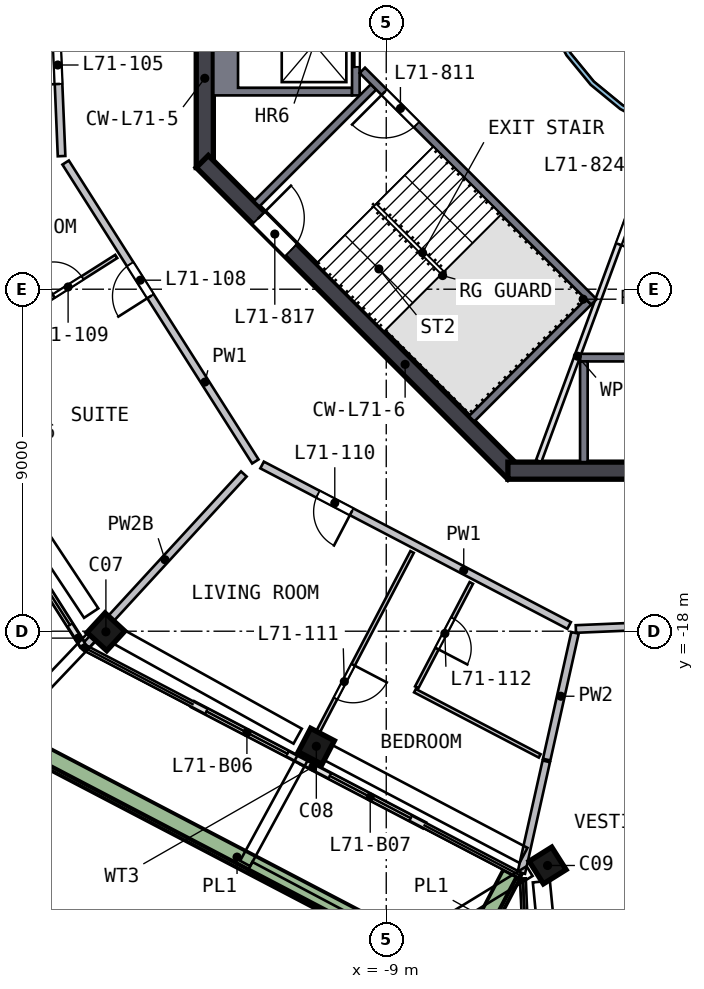
"""IFC4 building model, lengths in metres.
Left out: names, types, materials, properties, quantities, classifications, styles, units other than length and angle.
Written with IfcOpenShell. Run it as: python <this file> out.ifc"""

import sys

from ifc_helpers import new_model, si_unit, direction, frame, frame_2d, origin, origin_2d, place, context, subcontext, project, spatial, polyline, rectangle, outline, extrude, element, fill, save


model = new_model("IFC4")
c1 = context("Model", 3, precision=1e-05, world=origin(), true_north=direction((0.0, 1.0)))
c2 = subcontext(c1, "Body", "Model", "MODEL_VIEW")
j1 = project(units=[si_unit("LENGTHUNIT", "METRE"), si_unit("PLANEANGLEUNIT", "RADIAN")], contexts=[c1])
p1 = place(None, origin())
s1 = spatial("IfcSite", under=j1, at=p1, CompositionType="ELEMENT")
p2 = place(p1, origin())
s2 = spatial("IfcBuilding", under=s1, at=p2, CompositionType="ELEMENT")
p3 = place(p2, frame((0.0, 0.0, 288.0)))
s3 = spatial("IfcBuildingStorey", under=s2, at=p3, CompositionType="ELEMENT", Elevation=288.0)
p4 = place(p3, frame((-16.481, -17.923, 0.0), z_axis=(0.085902454, -0.077616288, 0.993275632), x_axis=(-0.731317306, 0.672140187, 0.115769454)))
e1 = element("IfcColumn", 1, at=p4, inside=s3, PredefinedType="COLUMN", context=c2, shape_type="SweptSolid", body=[
    extrude(rectangle(XDim=0.7, YDim=0.7, at=origin_2d()), origin(), (0.0, 0.0, 1.0), 3.211),
])
p5 = place(p3, frame((-10.961, -20.966, 0.0), z_axis=(0.100155575, -0.051332584, 0.993646731), x_axis=(0.880391875, -0.460700416, -0.112540095)))
e2 = element("IfcColumn", 2, at=p5, inside=s3, PredefinedType="COLUMN", context=c2, shape_type="SweptSolid", body=[
    extrude(rectangle(XDim=0.7, YDim=0.7, at=origin_2d()), origin(), (0.0, 0.0, 1.0), 3.21),
])
p6 = place(p3, frame((-4.894, -24.138, 0.0), z_axis=(0.114924367, -0.022346405, 0.993122867), x_axis=(-0.527951696, 0.845486805, 0.080119094)))
e3 = element("IfcColumn", 3, at=p6, inside=s3, PredefinedType="COLUMN", context=c2, shape_type="SweptSolid", body=[
    extrude(rectangle(XDim=0.7, YDim=0.7, at=origin_2d()), origin(), (0.0, 0.0, 1.0), 3.212),
])
p7 = place(p3, frame((-13.775, 5.799, 0.0), z_axis=(0.0, 0.0, 1.0), x_axis=(0.0, -1.0, 0.0)))
e4 = element("IfcWall", 4, at=p7, inside=s3, PredefinedType="SHEAR", context=c2, shape_type="SweptSolid", body=[
    extrude(rectangle(XDim=11.598, YDim=0.45, at=frame_2d((5.799, 0.0))), origin(), (0.0, 0.0, 1.0), 3.5),
])
p8 = place(p7, frame((4.899, 0.0, 0.0)))
e5 = element("IfcOpeningElement", 5, at=p8, cuts=e4, PredefinedType="OPENING", context=c2, shape_type="SweptSolid", body=[
    extrude(rectangle(XDim=1.8, YDim=2.1, at=frame_2d((0.9, 1.05))), frame((0.0, 0.235, 0.0), z_axis=(0.0, -1.0, 0.0), x_axis=(1.0, 0.0, 0.0)), (0.0, 0.0, 1.0), 0.47),
])
p9 = place(p3, frame((-13.841, -5.64, 0.0), z_axis=(0.0, 0.0, 1.0), x_axis=(0.707106781, -0.707106781, 0.0)))
e6 = element("IfcWall", 6, at=p9, inside=s3, PredefinedType="SHEAR", context=c2, shape_type="SweptSolid", body=[
    extrude(rectangle(XDim=11.598, YDim=0.45, at=frame_2d((5.799, 0.0))), origin(), (0.0, 0.0, 1.0), 3.5),
])
p10 = place(p9, frame((2.099, 0.0, 0.0)))
e7 = element("IfcOpeningElement", 7, at=p10, cuts=e6, PredefinedType="OPENING", context=c2, shape_type="SweptSolid", body=[
    extrude(rectangle(XDim=1.2, YDim=2.1, at=frame_2d((0.6, 1.05))), frame((0.0, 0.235, 0.0), z_axis=(0.0, -1.0, 0.0), x_axis=(1.0, 0.0, 0.0)), (0.0, 0.0, 1.0), 0.47),
])
p11 = place(p3, frame((-5.799, -13.775, 0.0), z_axis=(0.0, 0.0, 1.0), x_axis=(1.0, 0.0, 0.0)))
e8 = element("IfcWall", 8, at=p11, inside=s3, PredefinedType="SHEAR", context=c2, shape_type="SweptSolid", body=[
    extrude(rectangle(XDim=11.598, YDim=0.45, at=frame_2d((5.799, 0.0))), origin(), (0.0, 0.0, 1.0), 3.5),
])
p12 = place(p3, frame((-18.826, -15.468, 0.0), z_axis=(0.0, 0.0, 1.0), x_axis=(0.53583323, -0.844323842, 0.0)))
e9 = element("IfcWall", 9, at=p12, inside=s3, PredefinedType="SOLIDWALL", context=c2, shape_type="SweptSolid", body=[
    extrude(rectangle(XDim=3.427, YDim=0.15, at=frame_2d((1.713, 0.0))), origin(), (0.0, 0.0, 1.0), 2.525),
])
p13 = place(p12, frame((0.4, 0.0, 0.0)))
e10 = element("IfcOpeningElement", 10, at=p13, cuts=e9, PredefinedType="OPENING", context=c2, shape_type="SweptSolid", body=[
    extrude(rectangle(XDim=2.4, YDim=2.4, at=frame_2d((1.2, 1.2))), frame((0.0, 0.085, 0.0), z_axis=(0.0, -1.0, 0.0), x_axis=(1.0, 0.0, 0.0)), (0.0, 0.0, 1.0), 0.17),
])
p14 = place(p3, frame((-14.084, -19.926, 0.0), z_axis=(0.0, 0.0, 1.0), x_axis=(0.886182685, -0.463336001, 0.0)))
e11 = element("IfcWall", 11, at=p14, inside=s3, PredefinedType="SOLIDWALL", context=c2, shape_type="SweptSolid", body=[
    extrude(rectangle(XDim=3.25, YDim=0.15, at=frame_2d((1.625, 0.0))), origin(), (0.0, 0.0, 1.0), 2.525),
])
p15 = place(p14, frame((0.4, 0.0, 0.0)))
e12 = element("IfcOpeningElement", 12, at=p15, cuts=e11, PredefinedType="OPENING", context=c2, shape_type="SweptSolid", body=[
    extrude(rectangle(XDim=2.4, YDim=2.4, at=frame_2d((1.2, 1.2))), frame((0.0, 0.085, 0.0), z_axis=(0.0, -1.0, 0.0), x_axis=(1.0, 0.0, 0.0)), (0.0, 0.0, 1.0), 0.17),
])
p16 = place(p3, frame((-11.204, -21.431, 0.0), z_axis=(0.0, 0.0, 1.0), x_axis=(0.886209674, -0.463284377, 0.0)))
e13 = element("IfcWall", 13, at=p16, inside=s3, PredefinedType="SOLIDWALL", context=c2, shape_type="SweptSolid", body=[
    extrude(rectangle(XDim=3.611, YDim=0.15, at=frame_2d((1.806, 0.0))), origin(), (0.0, 0.0, 1.0), 2.525),
])
p17 = place(p16, frame((0.811, 0.0, 0.0)))
e14 = element("IfcOpeningElement", 14, at=p17, cuts=e13, PredefinedType="OPENING", context=c2, shape_type="SweptSolid", body=[
    extrude(rectangle(XDim=2.4, YDim=2.4, at=frame_2d((1.2, 1.2))), frame((0.0, 0.085, 0.0), z_axis=(0.0, -1.0, 0.0), x_axis=(1.0, 0.0, 0.0)), (0.0, 0.0, 1.0), 0.17),
])
p18 = place(p3, frame((-19.007, -20.766, 0.0), z_axis=(0.0, 0.0, 1.0), x_axis=(0.886208346, -0.463286917, 0.0)))
e15 = element("IfcWall", 15, at=p18, inside=s3, PredefinedType="SOLIDWALL", context=c2, shape_type="SweptSolid", body=[
    extrude(rectangle(XDim=13.723, YDim=0.5, at=frame_2d((6.862, 0.0))), origin(), (0.0, 0.0, 1.0), 0.7),
])
p19 = place(p3, frame((-6.951, -26.786, 0.0), z_axis=(0.0, 0.0, 1.0), x_axis=(0.463313949, 0.886194214, 0.0)))
e16 = element("IfcWall", 16, at=p19, inside=s3, PredefinedType="SOLIDWALL", context=c2, shape_type="SweptSolid", body=[
    extrude(rectangle(XDim=2.699, YDim=0.5, at=frame_2d((1.35, 0.0))), origin(), (0.0, 0.0, 1.0), 0.7),
])
p20 = place(p3, origin())
e17 = element("IfcWall", 17, at=p20, inside=s3, PredefinedType="SOLIDWALL", context=c2, shape_type="SweptSolid", body=[
    extrude(outline(polyline([(-13.55, -3.9), (-13.55, -1.2), (-9.9, -1.2), (-9.9, -1.4), (-12.9, -1.4), (-12.9, -3.7), (-9.9, -3.7), (-9.9, -3.9), (-13.55, -3.9)])), origin(), (0.0, 0.0, 1.0), 3.19),
])
p21 = place(p3, frame((-9.8, -1.2, 0.0), z_axis=(0.0, 0.0, 1.0), x_axis=(0.0, -1.0, 0.0)))
e18 = element("IfcWall", 18, at=p21, inside=s3, PredefinedType="SOLIDWALL", context=c2, shape_type="SweptSolid", body=[
    extrude(rectangle(XDim=2.7, YDim=0.2, at=frame_2d((1.35, 0.0))), origin(), (0.0, 0.0, 1.0), 3.19),
])
p22 = place(p21, frame((0.75, 0.0, 0.0)))
e19 = element("IfcOpeningElement", 19, at=p22, cuts=e18, PredefinedType="OPENING", context=c2, shape_type="SweptSolid", body=[
    extrude(rectangle(XDim=1.2, YDim=2.1, at=frame_2d((0.6, 1.05))), frame((0.0, 0.11, 0.0), z_axis=(0.0, -1.0, 0.0), x_axis=(1.0, 0.0, 0.0)), (0.0, 0.0, 1.0), 0.22),
])
p23 = place(p3, frame((-3.9, -10.8, 0.0), z_axis=(0.0, 0.0, 1.0), x_axis=(1.0, 0.0, 0.0)))
e20 = element("IfcWall", 20, at=p23, inside=s3, PredefinedType="SOLIDWALL", context=c2, shape_type="SweptSolid", body=[
    extrude(rectangle(XDim=7.8, YDim=0.2, at=frame_2d((3.9, 0.0))), origin(), (0.0, 0.0, 1.0), 3.19),
])
p24 = place(p23, frame((3.45, 0.0, 0.0)))
e21 = element("IfcOpeningElement", 21, at=p24, cuts=e20, PredefinedType="OPENING", context=c2, shape_type="SweptSolid", body=[
    extrude(rectangle(XDim=0.9, YDim=2.1, at=frame_2d((0.45, 1.05))), frame((0.0, 0.11, 0.0), z_axis=(0.0, -1.0, 0.0), x_axis=(1.0, 0.0, 0.0)), (0.0, 0.0, 1.0), 0.22),
])
p25 = place(p3, frame((-3.8, -10.9, 0.0), z_axis=(0.0, 0.0, 1.0), x_axis=(0.0, -1.0, 0.0)))
e22 = element("IfcWall", 22, at=p25, inside=s3, PredefinedType="SOLIDWALL", context=c2, shape_type="SweptSolid", body=[
    extrude(rectangle(XDim=2.65, YDim=0.2, at=frame_2d((1.325, 0.0))), origin(), (0.0, 0.0, 1.0), 3.19),
])
p26 = place(p3, frame((-3.535, -9.334, 0.0), z_axis=(0.0, 0.0, 1.0), x_axis=(-0.707120946, 0.707092617, 0.0)))
e23 = element("IfcWall", 23, at=p26, inside=s3, PredefinedType="SOLIDWALL", context=c2, shape_type="SweptSolid", body=[
    extrude(rectangle(XDim=8.618, YDim=0.2, at=frame_2d((4.309, 0.0))), origin(), (0.0, 0.0, 1.0), 3.19),
])
p27 = place(p26, frame((6.6, 0.0, 0.0)))
e24 = element("IfcOpeningElement", 24, at=p27, cuts=e23, PredefinedType="OPENING", context=c2, shape_type="SweptSolid", body=[
    extrude(rectangle(XDim=1.2, YDim=2.1, at=frame_2d((0.6, 1.05))), frame((0.0, 0.11, 0.0), z_axis=(0.0, -1.0, 0.0), x_axis=(1.0, 0.0, 0.0)), (0.0, 0.0, 1.0), 0.22),
])
for number, where, z_axis, x_axis in (
    (25, (-9.334, -3.677, 0.0), (0.0, 0.0, 1.0), (-0.707, -0.707, 0.0)),
    (26, (-3.677, -9.334, 0.0), (0.0, 0.0, 1.0), (-0.707, -0.707, 0.0)),
):
    element("IfcWall", number, at=place(p3, frame(where, z_axis=z_axis, x_axis=x_axis)), inside=s3, PredefinedType="SOLIDWALL", context=c2, shape_type="SweptSolid", body=[
        extrude(rectangle(XDim=4.35, YDim=0.2, at=frame_2d((2.175, 0.0))), origin(), (0.0, 0.0, 1.0), 3.19),
    ])
p28 = place(p3, frame((-1.776, -4.813, 0.0), z_axis=(0.0, 0.0, 1.0), x_axis=(-0.346114844, -0.938192152, 0.0)))
e27 = element("IfcWall", 27, at=p28, inside=s3, PredefinedType="PARTITIONING", context=c2, shape_type="SweptSolid", body=[
    extrude(rectangle(XDim=9.283, YDim=0.15, at=frame_2d((4.641, 0.0))), origin(), (0.0, 0.0, 1.0), 3.19),
])
p29 = place(p28, frame((1.4, 0.0, 0.0)))
e28 = element("IfcOpeningElement", 28, at=p29, cuts=e27, PredefinedType="OPENING", context=c2, shape_type="SweptSolid", body=[
    extrude(rectangle(XDim=1.8, YDim=2.1, at=frame_2d((0.9, 1.05))), frame((0.0, 0.085, 0.0), z_axis=(0.0, -1.0, 0.0), x_axis=(1.0, 0.0, 0.0)), (0.0, 0.0, 1.0), 0.17),
])
p30 = place(p3, origin())
e29 = element("IfcWall", 29, at=p30, inside=s3, PredefinedType="SOLIDWALL", context=c2, shape_type="SweptSolid", body=[
    extrude(outline(polyline([(5.021, -0.999), (4.73, -1.959), (4.257, -2.844), (3.62, -3.62), (2.844, -4.257), (1.959, -4.73), (0.999, -5.021), (0.0, -5.12), (-0.999, -5.021), (-1.959, -4.73), (-2.844, -4.257), (-3.62, -3.62), (-4.257, -2.844), (-4.73, -1.959), (-5.021, -0.999), (-5.12, 0.0), (-5.021, 0.999), (-4.73, 1.959), (-4.257, 2.844), (-3.62, 3.62), (-2.844, 4.257), (-1.959, 4.73), (-0.999, 5.021), (0.0, 5.12), (0.999, 5.021), (1.959, 4.73), (2.844, 4.257), (3.62, 3.62), (4.257, 2.844), (4.73, 1.959), (5.021, 0.999), (5.12, 0.0), (5.021, -0.999)]), holes=[polyline([(4.904, 0.976), (4.619, 1.913), (4.157, 2.778), (3.535, 3.535), (2.778, 4.157), (1.913, 4.619), (0.976, 4.904), (0.0, 5.0), (-0.976, 4.904), (-1.913, 4.619), (-2.778, 4.157), (-3.535, 3.535), (-4.157, 2.778), (-4.619, 1.913), (-4.904, 0.976), (-5.0, 0.0), (-4.904, -0.976), (-4.619, -1.913), (-4.157, -2.778), (-3.535, -3.535), (-2.778, -4.157), (-1.913, -4.619), (-0.976, -4.904), (0.0, -5.0), (0.976, -4.904), (1.913, -4.619), (2.778, -4.157), (3.535, -3.535), (4.157, -2.778), (4.619, -1.913), (4.904, -0.976), (5.0, 0.0), (4.904, 0.976)])]), origin(), (0.0, 0.0, 1.0), 3.19),
])
p31 = place(p3, frame((-17.543, -5.498, 0.0), z_axis=(0.0, 0.0, 1.0), x_axis=(-0.041874694, 0.99912287, 0.0)))
e30 = element("IfcWall", 30, at=p31, inside=s3, PredefinedType="SOLIDWALL", context=c2, shape_type="SweptSolid", body=[
    extrude(rectangle(XDim=9.317, YDim=0.2, at=frame_2d((4.658, 0.0))), origin(), (0.0, 0.0, 1.0), 3.19),
])
p32 = place(p31, frame((1.9, 0.0, 0.0)))
e31 = element("IfcOpeningElement", 31, at=p32, cuts=e30, PredefinedType="OPENING", context=c2, shape_type="SweptSolid", body=[
    extrude(rectangle(XDim=1.0, YDim=2.1, at=frame_2d((0.5, 1.05))), frame((0.0, 0.11, 0.0), z_axis=(0.0, -1.0, 0.0), x_axis=(1.0, 0.0, 0.0)), (0.0, 0.0, 1.0), 0.22),
])
p33 = place(p3, frame((-12.444, -13.533, 0.0), z_axis=(0.0, 0.0, 1.0), x_axis=(-0.535837373, 0.844321212, 0.0)))
e32 = element("IfcWall", 32, at=p33, inside=s3, PredefinedType="SOLIDWALL", context=c2, shape_type="SweptSolid", body=[
    extrude(rectangle(XDim=9.317, YDim=0.2, at=frame_2d((4.658, 0.0))), origin(), (0.0, 0.0, 1.0), 3.19),
])
p34 = place(p33, frame((5.15, 0.0, 0.0)))
e33 = element("IfcOpeningElement", 33, at=p34, cuts=e32, PredefinedType="OPENING", context=c2, shape_type="SweptSolid", body=[
    extrude(rectangle(XDim=1.0, YDim=2.1, at=frame_2d((0.5, 1.05))), frame((0.0, 0.11, 0.0), z_axis=(0.0, -1.0, 0.0), x_axis=(1.0, 0.0, 0.0)), (0.0, 0.0, 1.0), 0.22),
])
p35 = place(p3, frame((-4.188, -17.849, 0.0), z_axis=(0.0, 0.0, 1.0), x_axis=(-0.886199207, 0.463304399, 0.0)))
e34 = element("IfcWall", 34, at=p35, inside=s3, PredefinedType="SOLIDWALL", context=c2, shape_type="SweptSolid", body=[
    extrude(rectangle(XDim=9.117, YDim=0.2, at=frame_2d((4.559, 0.0))), origin(), (0.0, 0.0, 1.0), 3.19),
])
p36 = place(p35, frame((6.458, 0.0, 0.0)))
e35 = element("IfcOpeningElement", 35, at=p36, cuts=e34, PredefinedType="OPENING", context=c2, shape_type="SweptSolid", body=[
    extrude(rectangle(XDim=1.0, YDim=2.1, at=frame_2d((0.5, 1.05))), frame((0.0, 0.11, 0.0), z_axis=(0.0, -1.0, 0.0), x_axis=(1.0, 0.0, 0.0)), (0.0, 0.0, 1.0), 0.22),
])
p37 = place(p3, frame((5.498, -17.543, 0.0), z_axis=(0.0, 0.0, 1.0), x_axis=(-0.999123175, -0.041867432, 0.0)))
e36 = element("IfcWall", 36, at=p37, inside=s3, PredefinedType="SOLIDWALL", context=c2, shape_type="SweptSolid", body=[
    extrude(rectangle(XDim=9.517, YDim=0.2, at=frame_2d((4.758, 0.0))), origin(), (0.0, 0.0, 1.0), 3.19),
])
p38 = place(p37, frame((3.837, 0.0, 0.0)))
e37 = element("IfcOpeningElement", 37, at=p38, cuts=e36, PredefinedType="OPENING", context=c2, shape_type="SweptSolid", body=[
    extrude(rectangle(XDim=1.8, YDim=2.1, at=frame_2d((0.9, 1.05))), frame((0.0, 0.11, 0.0), z_axis=(0.0, -1.0, 0.0), x_axis=(1.0, 0.0, 0.0)), (0.0, 0.0, 1.0), 0.22),
])
p39 = place(p3, frame((-12.747, -13.862, 0.0), z_axis=(0.0, 0.0, 1.0), x_axis=(-0.676863295, -0.736108742, 0.0)))
e38 = element("IfcWall", 38, at=p39, inside=s3, PredefinedType="SOLIDWALL", context=c2, shape_type="SweptSolid", body=[
    extrude(rectangle(XDim=6.132, YDim=0.2, at=frame_2d((3.066, 0.0))), origin(), (0.0, 0.0, 1.0), 2.69),
])
p40 = place(p3, frame((-5.446, -24.363, 0.0), z_axis=(0.0, 0.0, 1.0), x_axis=(0.218175034, 0.975909655, 0.0)))
e39 = element("IfcWall", 39, at=p40, inside=s3, PredefinedType="SOLIDWALL", context=c2, shape_type="SweptSolid", body=[
    extrude(rectangle(XDim=3.011, YDim=0.2, at=frame_2d((1.506, 0.0))), origin(), (0.0, 0.0, 1.0), 3.19),
])
p41 = place(p3, frame((-4.779, -21.379, 0.0), z_axis=(0.0, 0.0, 1.0), x_axis=(0.218109953, 0.975924202, 0.0)))
e40 = element("IfcWall", 40, at=p41, inside=s3, PredefinedType="SOLIDWALL", context=c2, shape_type="SweptSolid", body=[
    extrude(rectangle(XDim=3.418, YDim=0.2, at=frame_2d((1.709, 0.0))), origin(), (0.0, 0.0, 1.0), 3.19),
])
p42 = place(p3, frame((-18.722, -9.799, 0.0), z_axis=(0.0, 0.0, 1.0), x_axis=(0.844319142, 0.535840635, 0.0)))
e41 = element("IfcWall", 41, at=p42, inside=s3, PredefinedType="PARTITIONING", context=c2, shape_type="SweptSolid", body=[
    extrude(rectangle(XDim=3.1, YDim=0.1, at=frame_2d((1.55, 0.0))), origin(), (0.0, 0.0, 1.0), 3.19),
])
p43 = place(p42, frame((1.15, 0.0, 0.0)))
e42 = element("IfcOpeningElement", 42, at=p43, cuts=e41, PredefinedType="OPENING", context=c2, shape_type="SweptSolid", body=[
    extrude(rectangle(XDim=0.9, YDim=2.1, at=frame_2d((0.45, 1.05))), frame((0.0, 0.06, 0.0), z_axis=(0.0, -1.0, 0.0), x_axis=(1.0, 0.0, 0.0)), (0.0, 0.0, 1.0), 0.12),
])
p44 = place(p3, frame((-8.32, -15.915, 0.0), z_axis=(0.0, 0.0, 1.0), x_axis=(-0.46327405, -0.886215072, 0.0)))
e43 = element("IfcWall", 43, at=p44, inside=s3, PredefinedType="PARTITIONING", context=c2, shape_type="SweptSolid", body=[
    extrude(rectangle(XDim=6.15, YDim=0.1, at=frame_2d((3.075, 0.0))), origin(), (0.0, 0.0, 1.0), 3.19),
])
p45 = place(p44, frame((3.35, 0.0, 0.0)))
e44 = element("IfcOpeningElement", 44, at=p45, cuts=e43, PredefinedType="OPENING", context=c2, shape_type="SweptSolid", body=[
    extrude(rectangle(XDim=1.0, YDim=2.1, at=frame_2d((0.5, 1.05))), frame((0.0, 0.06, 0.0), z_axis=(0.0, -1.0, 0.0), x_axis=(1.0, 0.0, 0.0)), (0.0, 0.0, 1.0), 0.12),
])
p46 = place(p3, frame((-6.762, -16.729, 0.0), z_axis=(0.0, 0.0, 1.0), x_axis=(-0.463332934, -0.886184288, 0.0)))
e45 = element("IfcWall", 45, at=p46, inside=s3, PredefinedType="PARTITIONING", context=c2, shape_type="SweptSolid", body=[
    extrude(rectangle(XDim=3.1, YDim=0.1, at=frame_2d((1.55, 0.0))), origin(), (0.0, 0.0, 1.0), 3.19),
])
p47 = place(p46, frame((1.05, 0.0, 0.0)))
e46 = element("IfcOpeningElement", 46, at=p47, cuts=e45, PredefinedType="OPENING", context=c2, shape_type="SweptSolid", body=[
    extrude(rectangle(XDim=0.9, YDim=2.1, at=frame_2d((0.45, 1.05))), frame((0.0, 0.06, 0.0), z_axis=(0.0, -1.0, 0.0), x_axis=(1.0, 0.0, 0.0)), (0.0, 0.0, 1.0), 0.12),
])
p48 = place(p3, frame((-8.244, -19.565, 0.0), z_axis=(0.0, 0.0, 1.0), x_axis=(0.886200227, -0.463302447, 0.0)))
e47 = element("IfcWall", 47, at=p48, inside=s3, PredefinedType="PARTITIONING", context=c2, shape_type="SweptSolid", body=[
    extrude(rectangle(XDim=3.704, YDim=0.1, at=frame_2d((1.852, 0.0))), origin(), (0.0, 0.0, 1.0), 3.19),
])
p49 = place(p13, origin())
e48 = element("IfcDoor", 48, at=p49, inside=s3, OperationType="SLIDING_TO_RIGHT", PredefinedType="DOOR", context=c2, shape_type="SweptSolid", body=[
    extrude(rectangle(XDim=2.4, YDim=2.4, at=frame_2d((1.2, 1.2))), frame((0.0, 0.025, 0.0), z_axis=(0.0, -1.0, 0.0), x_axis=(1.0, 0.0, 0.0)), (0.0, 0.0, 1.0), 0.05),
])
fill(e10, e48)
p50 = place(p15, origin())
e49 = element("IfcDoor", 49, at=p50, inside=s3, OperationType="SLIDING_TO_RIGHT", PredefinedType="DOOR", context=c2, shape_type="SweptSolid", body=[
    extrude(rectangle(XDim=2.4, YDim=2.4, at=frame_2d((1.2, 1.2))), frame((0.0, 0.025, 0.0), z_axis=(0.0, -1.0, 0.0), x_axis=(1.0, 0.0, 0.0)), (0.0, 0.0, 1.0), 0.05),
])
fill(e12, e49)
p51 = place(p17, origin())
e50 = element("IfcDoor", 50, at=p51, inside=s3, OperationType="SLIDING_TO_LEFT", PredefinedType="DOOR", context=c2, shape_type="SweptSolid", body=[
    extrude(rectangle(XDim=2.4, YDim=2.4, at=frame_2d((1.2, 1.2))), frame((0.0, 0.025, 0.0), z_axis=(0.0, -1.0, 0.0), x_axis=(1.0, 0.0, 0.0)), (0.0, 0.0, 1.0), 0.05),
])
fill(e14, e50)
p52 = place(p22, origin())
e51 = element("IfcDoor", 51, at=p52, inside=s3, OperationType="DOUBLE_DOOR_SLIDING", PredefinedType="DOOR", context=c2, shape_type="SweptSolid", body=[
    extrude(rectangle(XDim=1.2, YDim=2.1, at=frame_2d((0.6, 1.05))), frame((0.0, 0.025, 0.0), z_axis=(0.0, -1.0, 0.0), x_axis=(1.0, 0.0, 0.0)), (0.0, 0.0, 1.0), 0.05),
])
fill(e19, e51)
p53 = place(p27, origin())
e52 = element("IfcDoor", 52, at=p53, inside=s3, OperationType="SINGLE_SWING_RIGHT", PredefinedType="DOOR", context=c2, shape_type="SweptSolid", body=[
    extrude(rectangle(XDim=1.2, YDim=2.1, at=frame_2d((0.6, 1.05))), frame((0.0, 0.025, 0.0), z_axis=(0.0, -1.0, 0.0), x_axis=(1.0, 0.0, 0.0)), (0.0, 0.0, 1.0), 0.05),
])
fill(e24, e52)
p54 = place(p10, origin())
e53 = element("IfcDoor", 53, at=p54, inside=s3, OperationType="SINGLE_SWING_LEFT", PredefinedType="DOOR", context=c2, shape_type="SweptSolid", body=[
    extrude(rectangle(XDim=1.2, YDim=2.1, at=frame_2d((0.6, 1.05))), frame((0.0, 0.025, 0.0), z_axis=(0.0, -1.0, 0.0), x_axis=(1.0, 0.0, 0.0)), (0.0, 0.0, 1.0), 0.05),
])
fill(e7, e53)
p55 = place(p29, origin())
e54 = element("IfcDoor", 54, at=p55, inside=s3, OperationType="DOUBLE_DOOR_SINGLE_SWING", PredefinedType="DOOR", context=c2, shape_type="SweptSolid", body=[
    extrude(rectangle(XDim=1.8, YDim=2.1, at=frame_2d((0.9, 1.05))), frame((0.0, 0.025, 0.0), z_axis=(0.0, -1.0, 0.0), x_axis=(1.0, 0.0, 0.0)), (0.0, 0.0, 1.0), 0.05),
])
fill(e28, e54)
p56 = place(p32, origin())
e55 = element("IfcDoor", 55, at=p56, inside=s3, OperationType="SINGLE_SWING_LEFT", PredefinedType="DOOR", context=c2, shape_type="SweptSolid", body=[
    extrude(rectangle(XDim=1.0, YDim=2.1, at=frame_2d((0.5, 1.05))), frame((0.0, 0.025, 0.0), z_axis=(0.0, -1.0, 0.0), x_axis=(1.0, 0.0, 0.0)), (0.0, 0.0, 1.0), 0.05),
])
fill(e31, e55)
p57 = place(p34, origin())
e56 = element("IfcDoor", 56, at=p57, inside=s3, OperationType="SINGLE_SWING_LEFT", PredefinedType="DOOR", context=c2, shape_type="SweptSolid", body=[
    extrude(rectangle(XDim=1.0, YDim=2.1, at=frame_2d((0.5, 1.05))), frame((0.0, 0.025, 0.0), z_axis=(0.0, -1.0, 0.0), x_axis=(1.0, 0.0, 0.0)), (0.0, 0.0, 1.0), 0.05),
])
fill(e33, e56)
p58 = place(p43, origin())
e57 = element("IfcDoor", 57, at=p58, inside=s3, OperationType="SINGLE_SWING_LEFT", PredefinedType="DOOR", context=c2, shape_type="SweptSolid", body=[
    extrude(rectangle(XDim=0.9, YDim=2.1, at=frame_2d((0.45, 1.05))), frame((0.0, 0.025, 0.0), z_axis=(0.0, -1.0, 0.0), x_axis=(1.0, 0.0, 0.0)), (0.0, 0.0, 1.0), 0.05),
])
fill(e42, e57)
p59 = place(p36, origin())
e58 = element("IfcDoor", 58, at=p59, inside=s3, OperationType="SINGLE_SWING_LEFT", PredefinedType="DOOR", context=c2, shape_type="SweptSolid", body=[
    extrude(rectangle(XDim=1.0, YDim=2.1, at=frame_2d((0.5, 1.05))), frame((0.0, 0.025, 0.0), z_axis=(0.0, -1.0, 0.0), x_axis=(1.0, 0.0, 0.0)), (0.0, 0.0, 1.0), 0.05),
])
fill(e35, e58)
p60 = place(p45, origin())
e59 = element("IfcDoor", 59, at=p60, inside=s3, OperationType="SINGLE_SWING_LEFT", PredefinedType="DOOR", context=c2, shape_type="SweptSolid", body=[
    extrude(rectangle(XDim=1.0, YDim=2.1, at=frame_2d((0.5, 1.05))), frame((0.0, 0.025, 0.0), z_axis=(0.0, -1.0, 0.0), x_axis=(1.0, 0.0, 0.0)), (0.0, 0.0, 1.0), 0.05),
])
fill(e44, e59)
p61 = place(p47, origin())
e60 = element("IfcDoor", 60, at=p61, inside=s3, OperationType="SINGLE_SWING_RIGHT", PredefinedType="DOOR", context=c2, shape_type="SweptSolid", body=[
    extrude(rectangle(XDim=0.9, YDim=2.1, at=frame_2d((0.45, 1.05))), frame((0.0, 0.025, 0.0), z_axis=(0.0, -1.0, 0.0), x_axis=(1.0, 0.0, 0.0)), (0.0, 0.0, 1.0), 0.05),
])
fill(e46, e60)
save(model, sys.argv[1])
